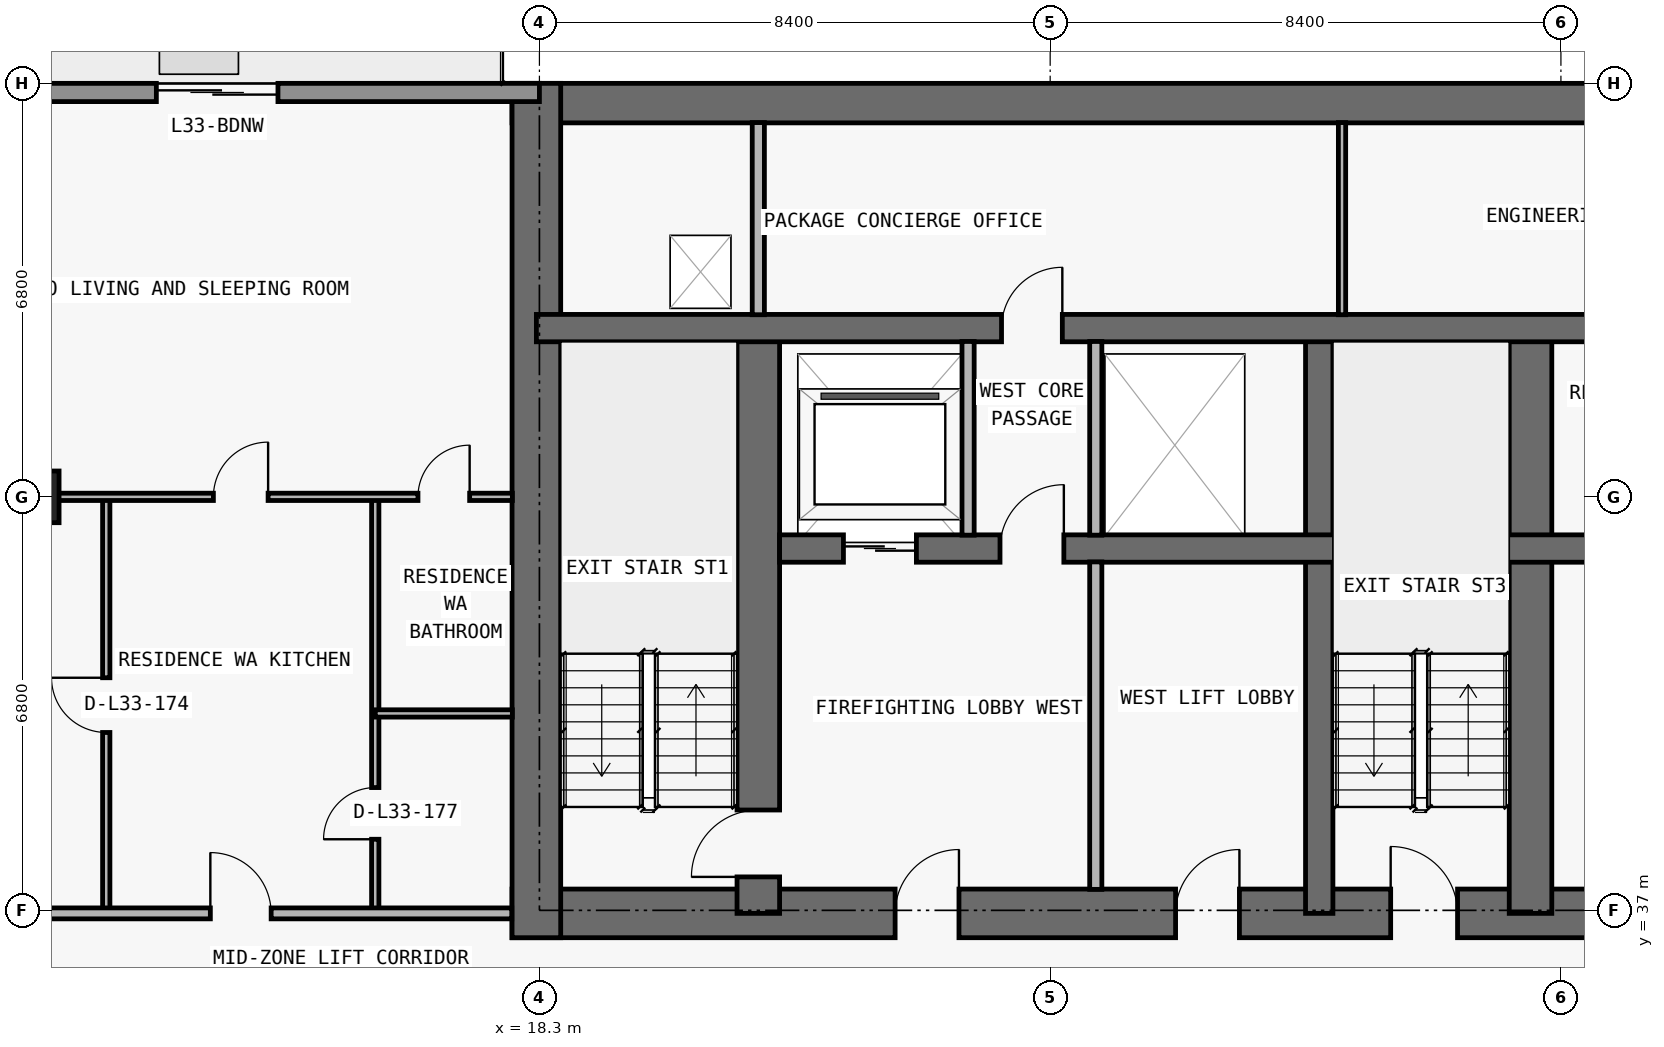
"""IFC4 building model, lengths in metres.
Left out: names, types, materials, properties, quantities, classifications, styles, units other than length and angle.
Written with IfcOpenShell. Run it as: python <this file> out.ifc"""

import sys

from ifc_helpers import new_model, si_unit, direction, frame, frame_2d, origin, origin_2d, place, context, subcontext, project, spatial, rectangle, extrude, element, fill, save


model = new_model("IFC4")
c1 = context("Model", 3, precision=1e-05, world=origin(), true_north=direction((0.0, 1.0)))
c2 = subcontext(c1, "Body", "Model", "MODEL_VIEW")
j1 = project(units=[si_unit("LENGTHUNIT", "METRE"), si_unit("PLANEANGLEUNIT", "RADIAN")], contexts=[c1])
p1 = place(None, origin())
s1 = spatial("IfcSite", under=j1, at=p1, CompositionType="ELEMENT")
p2 = place(p1, origin())
s2 = spatial("IfcBuilding", under=s1, at=p2, CompositionType="ELEMENT")
p3 = place(p2, frame((0.0, 0.0, 122.4)))
s3 = spatial("IfcBuildingStorey", under=s2, at=p3, CompositionType="ELEMENT", Elevation=122.4)
p4 = place(p3, frame((9.9, 43.8, 0.0), z_axis=(0.0, 0.0, 1.0), x_axis=(1.0, 0.0, 0.0)))
e1 = element("IfcColumn", 1, at=p4, inside=s3, PredefinedType="COLUMN", context=c2, shape_type="SweptSolid", body=[
    extrude(rectangle(XDim=1.0, YDim=0.85, at=origin_2d()), origin(), (0.0, 0.0, 1.0), 3.05),
])
p5 = place(p3, frame((17.85, 36.95, 0.0), z_axis=(0.0, 0.0, 1.0), x_axis=(1.0, 0.0, 0.0)))
e2 = element("IfcWall", 2, at=p5, inside=s3, PredefinedType="SHEAR", context=c2, shape_type="SweptSolid", body=[
    extrude(rectangle(XDim=42.1, YDim=0.8, at=frame_2d((21.05, 0.0))), origin(), (0.0, 0.0, 1.0), 3.05),
])
p6 = place(p5, frame((14.45, 0.0, 0.0)))
e3 = element("IfcOpeningElement", 3, at=p6, cuts=e2, PredefinedType="OPENING", context=c2, shape_type="SweptSolid", body=[
    extrude(rectangle(XDim=1.1, YDim=2.15, at=frame_2d((0.55, 1.075))), frame((0.0, 0.41, 0.0), z_axis=(0.0, -1.0, 0.0), x_axis=(1.0, 0.0, 0.0)), (0.0, 0.0, 1.0), 0.82),
])
p7 = place(p5, frame((6.3, 0.0, 0.0)))
e4 = element("IfcOpeningElement", 4, at=p7, cuts=e2, PredefinedType="OPENING", context=c2, shape_type="SweptSolid", body=[
    extrude(rectangle(XDim=1.05, YDim=2.15, at=frame_2d((0.525, 1.075))), frame((0.0, 0.41, 0.0), z_axis=(0.0, -1.0, 0.0), x_axis=(1.0, 0.0, 0.0)), (0.0, 0.0, 1.0), 0.82),
])
p8 = place(p5, frame((34.8, 0.0, 0.0)))
e5 = element("IfcOpeningElement", 5, at=p8, cuts=e2, PredefinedType="OPENING", context=c2, shape_type="SweptSolid", body=[
    extrude(rectangle(XDim=1.05, YDim=2.15, at=frame_2d((0.525, 1.075))), frame((0.0, 0.41, 0.0), z_axis=(0.0, -1.0, 0.0), x_axis=(1.0, 0.0, 0.0)), (0.0, 0.0, 1.0), 0.82),
])
p9 = place(p5, frame((10.913, 0.0, 0.0)))
e6 = element("IfcOpeningElement", 6, at=p9, cuts=e2, PredefinedType="OPENING", context=c2, shape_type="SweptSolid", body=[
    extrude(rectangle(XDim=1.05, YDim=2.15, at=frame_2d((0.525, 1.075))), frame((0.0, 0.41, 0.0), z_axis=(0.0, -1.0, 0.0), x_axis=(1.0, 0.0, 0.0)), (0.0, 0.0, 1.0), 0.82),
])
p10 = place(p5, frame((24.15, 0.0, 0.0)))
e7 = element("IfcOpeningElement", 7, at=p10, cuts=e2, PredefinedType="OPENING", context=c2, shape_type="SweptSolid", body=[
    extrude(rectangle(XDim=1.05, YDim=2.15, at=frame_2d((0.525, 1.075))), frame((0.0, 0.41, 0.0), z_axis=(0.0, -1.0, 0.0), x_axis=(1.0, 0.0, 0.0)), (0.0, 0.0, 1.0), 0.82),
])
p11 = place(p3, frame((17.85, 50.275, 0.0), z_axis=(0.0, 0.0, 1.0), x_axis=(1.0, 0.0, 0.0)))
e8 = element("IfcWall", 8, at=p11, inside=s3, PredefinedType="SHEAR", context=c2, shape_type="SweptSolid", body=[
    extrude(rectangle(XDim=42.1, YDim=0.65, at=frame_2d((21.05, 0.0))), origin(), (0.0, 0.0, 1.0), 3.05),
])
p12 = place(p3, frame((18.25, 36.55, 0.0), z_axis=(0.0, 0.0, 1.0), x_axis=(0.0, 1.0, 0.0)))
e9 = element("IfcWall", 9, at=p12, inside=s3, PredefinedType="SHEAR", context=c2, shape_type="SweptSolid", body=[
    extrude(rectangle(XDim=14.05, YDim=0.8, at=frame_2d((7.025, 0.0))), origin(), (0.0, 0.0, 1.0), 3.05),
])
p13 = place(p3, frame((21.9, 36.95, 0.0), z_axis=(0.0, 0.0, 1.0), x_axis=(0.0, 1.0, 0.0)))
e10 = element("IfcWall", 10, at=p13, inside=s3, PredefinedType="SHEAR", context=c2, shape_type="SweptSolid", body=[
    extrude(rectangle(XDim=9.625, YDim=0.7, at=frame_2d((4.812, 0.0))), origin(), (0.0, 0.0, 1.0), 3.05),
])
p14 = place(p13, frame((0.6, 0.0, 0.0)))
e11 = element("IfcOpeningElement", 11, at=p14, cuts=e10, PredefinedType="OPENING", context=c2, shape_type="SweptSolid", body=[
    extrude(rectangle(XDim=1.1, YDim=2.15, at=frame_2d((0.55, 1.075))), frame((0.0, 0.36, 0.0), z_axis=(0.0, -1.0, 0.0), x_axis=(1.0, 0.0, 0.0)), (0.0, 0.0, 1.0), 0.72),
])
p15 = place(p3, frame((31.125, 36.95, 0.0), z_axis=(0.0, 0.0, 1.0), x_axis=(0.0, 1.0, 0.0)))
e12 = element("IfcWall", 12, at=p15, inside=s3, PredefinedType="SHEAR", context=c2, shape_type="SweptSolid", body=[
    extrude(rectangle(XDim=9.625, YDim=0.45, at=frame_2d((4.812, 0.0))), origin(), (0.0, 0.0, 1.0), 3.05),
])
p16 = place(p3, frame((34.6, 36.95, 0.0), z_axis=(0.0, 0.0, 1.0), x_axis=(0.0, 1.0, 0.0)))
e13 = element("IfcWall", 13, at=p16, inside=s3, PredefinedType="SHEAR", context=c2, shape_type="SweptSolid", body=[
    extrude(rectangle(XDim=9.625, YDim=0.7, at=frame_2d((4.812, 0.0))), origin(), (0.0, 0.0, 1.0), 3.05),
])
p17 = place(p3, frame((22.25, 42.95, 0.0), z_axis=(0.0, 0.0, 1.0), x_axis=(1.0, 0.0, 0.0)))
e14 = element("IfcWall", 14, at=p17, inside=s3, PredefinedType="SHEAR", context=c2, shape_type="SweptSolid", body=[
    extrude(rectangle(XDim=33.3, YDim=0.45, at=frame_2d((16.65, 0.0))), origin(), (0.0, 0.0, 1.0), 3.05),
])
p18 = place(p17, frame((1.05, 0.0, 0.0)))
e15 = element("IfcOpeningElement", 15, at=p18, cuts=e14, PredefinedType="OPENING", context=c2, shape_type="SweptSolid", body=[
    extrude(rectangle(XDim=1.2, YDim=2.2, at=frame_2d((0.6, 1.1))), frame((0.0, 0.235, 0.0), z_axis=(0.0, -1.0, 0.0), x_axis=(1.0, 0.0, 0.0)), (0.0, 0.0, 1.0), 0.47),
])
p19 = place(p17, frame((31.05, 0.0, 0.0)))
e16 = element("IfcOpeningElement", 16, at=p19, cuts=e14, PredefinedType="OPENING", context=c2, shape_type="SweptSolid", body=[
    extrude(rectangle(XDim=1.2, YDim=2.2, at=frame_2d((0.6, 1.1))), frame((0.0, 0.235, 0.0), z_axis=(0.0, -1.0, 0.0), x_axis=(1.0, 0.0, 0.0)), (0.0, 0.0, 1.0), 0.47),
])
p20 = place(p17, frame((21.4, 0.0, 0.0)))
e17 = element("IfcOpeningElement", 17, at=p20, cuts=e14, PredefinedType="OPENING", context=c2, shape_type="SweptSolid", body=[
    extrude(rectangle(XDim=1.1, YDim=2.2, at=frame_2d((0.55, 1.1))), frame((0.0, 0.235, 0.0), z_axis=(0.0, -1.0, 0.0), x_axis=(1.0, 0.0, 0.0)), (0.0, 0.0, 1.0), 0.47),
])
p21 = place(p17, frame((24.0, 0.0, 0.0)))
e18 = element("IfcOpeningElement", 18, at=p21, cuts=e14, PredefinedType="OPENING", context=c2, shape_type="SweptSolid", body=[
    extrude(rectangle(XDim=1.1, YDim=2.2, at=frame_2d((0.55, 1.1))), frame((0.0, 0.235, 0.0), z_axis=(0.0, -1.0, 0.0), x_axis=(1.0, 0.0, 0.0)), (0.0, 0.0, 1.0), 0.47),
])
p22 = place(p17, frame((3.625, 0.0, 0.0)))
e19 = element("IfcOpeningElement", 19, at=p22, cuts=e14, PredefinedType="OPENING", context=c2, shape_type="SweptSolid", body=[
    extrude(rectangle(XDim=1.05, YDim=2.15, at=frame_2d((0.525, 1.075))), frame((0.0, 0.235, 0.0), z_axis=(0.0, -1.0, 0.0), x_axis=(1.0, 0.0, 0.0)), (0.0, 0.0, 1.0), 0.47),
])
p23 = place(p17, frame((28.675, 0.0, 0.0)))
e20 = element("IfcOpeningElement", 20, at=p23, cuts=e14, PredefinedType="OPENING", context=c2, shape_type="SweptSolid", body=[
    extrude(rectangle(XDim=1.05, YDim=2.15, at=frame_2d((0.525, 1.075))), frame((0.0, 0.235, 0.0), z_axis=(0.0, -1.0, 0.0), x_axis=(1.0, 0.0, 0.0)), (0.0, 0.0, 1.0), 0.47),
])
p24 = place(p17, frame((13.925, 0.0, 0.0)))
e21 = element("IfcOpeningElement", 21, at=p24, cuts=e14, PredefinedType="OPENING", context=c2, shape_type="SweptSolid", body=[
    extrude(rectangle(XDim=1.0, YDim=2.2, at=frame_2d((0.5, 1.1))), frame((0.0, 0.235, 0.0), z_axis=(0.0, -1.0, 0.0), x_axis=(1.0, 0.0, 0.0)), (0.0, 0.0, 1.0), 0.47),
])
p25 = place(p17, frame((18.05, 0.0, 0.0)))
e22 = element("IfcOpeningElement", 22, at=p25, cuts=e14, PredefinedType="OPENING", context=c2, shape_type="SweptSolid", body=[
    extrude(rectangle(XDim=1.0, YDim=2.2, at=frame_2d((0.5, 1.1))), frame((0.0, 0.235, 0.0), z_axis=(0.0, -1.0, 0.0), x_axis=(1.0, 0.0, 0.0)), (0.0, 0.0, 1.0), 0.47),
])
p26 = place(p3, frame((18.25, 46.575, 0.0), z_axis=(0.0, 0.0, 1.0), x_axis=(1.0, 0.0, 0.0)))
e23 = element("IfcWall", 23, at=p26, inside=s3, PredefinedType="SHEAR", context=c2, shape_type="SweptSolid", body=[
    extrude(rectangle(XDim=41.3, YDim=0.45, at=frame_2d((20.65, 0.0))), origin(), (0.0, 0.0, 1.0), 3.05),
])
p27 = place(p26, frame((7.65, 0.0, 0.0)))
e24 = element("IfcOpeningElement", 24, at=p27, cuts=e23, PredefinedType="OPENING", context=c2, shape_type="SweptSolid", body=[
    extrude(rectangle(XDim=1.0, YDim=2.2, at=frame_2d((0.5, 1.1))), frame((0.0, 0.235, 0.0), z_axis=(0.0, -1.0, 0.0), x_axis=(1.0, 0.0, 0.0)), (0.0, 0.0, 1.0), 0.47),
])
p28 = place(p26, frame((32.675, 0.0, 0.0)))
e25 = element("IfcOpeningElement", 25, at=p28, cuts=e23, PredefinedType="OPENING", context=c2, shape_type="SweptSolid", body=[
    extrude(rectangle(XDim=1.05, YDim=2.15, at=frame_2d((0.525, 1.075))), frame((0.0, 0.235, 0.0), z_axis=(0.0, -1.0, 0.0), x_axis=(1.0, 0.0, 0.0)), (0.0, 0.0, 1.0), 0.47),
])
p29 = place(p3, frame((7.7, 50.45, 0.0), z_axis=(0.0, 0.0, 1.0), x_axis=(1.0, 0.0, 0.0)))
e26 = element("IfcWall", 26, at=p29, inside=s3, PredefinedType="STANDARD", context=c2, shape_type="SweptSolid", body=[
    extrude(rectangle(XDim=10.6, YDim=0.3, at=frame_2d((5.3, 0.0))), origin(), (0.0, 0.0, 1.0), 3.05),
])
p30 = place(p29, frame((4.3, 0.0, 0.0)))
e27 = element("IfcOpeningElement", 27, at=p30, cuts=e26, PredefinedType="OPENING", context=c2, shape_type="SweptSolid", body=[
    extrude(rectangle(XDim=2.0, YDim=2.3, at=frame_2d((1.0, 1.15))), frame((0.0, 0.16, 0.0), z_axis=(0.0, -1.0, 0.0), x_axis=(1.0, 0.0, 0.0)), (0.0, 0.0, 1.0), 0.32),
])
p31 = place(p3, frame((11.176, 36.95, 0.0), z_axis=(0.0, 0.0, 1.0), x_axis=(0.0, 1.0, 0.0)))
e28 = element("IfcWall", 28, at=p31, inside=s3, PredefinedType="PARTITIONING", context=c2, shape_type="SweptSolid", body=[
    extrude(rectangle(XDim=6.85, YDim=0.12, at=frame_2d((3.425, 0.0))), origin(), (0.0, 0.0, 1.0), 3.05),
])
p32 = place(p31, frame((2.975, 0.0, 0.0)))
e29 = element("IfcOpeningElement", 29, at=p32, cuts=e28, PredefinedType="OPENING", context=c2, shape_type="SweptSolid", body=[
    extrude(rectangle(XDim=0.9, YDim=2.15, at=frame_2d((0.45, 1.075))), frame((0.0, 0.07, 0.0), z_axis=(0.0, -1.0, 0.0), x_axis=(1.0, 0.0, 0.0)), (0.0, 0.0, 1.0), 0.14),
])
p33 = place(p3, frame((15.6, 36.95, 0.0), z_axis=(0.0, 0.0, 1.0), x_axis=(0.0, 1.0, 0.0)))
e30 = element("IfcWall", 30, at=p33, inside=s3, PredefinedType="PARTITIONING", context=c2, shape_type="SweptSolid", body=[
    extrude(rectangle(XDim=6.85, YDim=0.12, at=frame_2d((3.425, 0.0))), origin(), (0.0, 0.0, 1.0), 3.05),
])
p34 = place(p33, frame((1.219, 0.0, 0.0)))
e31 = element("IfcOpeningElement", 31, at=p34, cuts=e30, PredefinedType="OPENING", context=c2, shape_type="SweptSolid", body=[
    extrude(rectangle(XDim=0.85, YDim=2.1, at=frame_2d((0.425, 1.05))), frame((0.0, 0.07, 0.0), z_axis=(0.0, -1.0, 0.0), x_axis=(1.0, 0.0, 0.0)), (0.0, 0.0, 1.0), 0.14),
])
p35 = place(p3, frame((21.9, 46.795, 0.0), z_axis=(0.0, 0.0, 1.0), x_axis=(0.0, 1.0, 0.0)))
e32 = element("IfcWall", 32, at=p35, inside=s3, PredefinedType="PARTITIONING", context=c2, shape_type="SweptSolid", body=[
    extrude(rectangle(XDim=3.16, YDim=0.2, at=frame_2d((1.58, 0.0))), origin(), (0.0, 0.0, 1.0), 3.05),
])
p36 = place(p3, frame((25.35, 43.17, 0.0), z_axis=(0.0, 0.0, 1.0), x_axis=(0.0, 1.0, 0.0)))
e33 = element("IfcWall", 33, at=p36, inside=s3, PredefinedType="PARTITIONING", context=c2, shape_type="SweptSolid", body=[
    extrude(rectangle(XDim=3.185, YDim=0.2, at=frame_2d((1.593, 0.0))), origin(), (0.0, 0.0, 1.0), 3.05),
])
p37 = place(p3, frame((27.45, 37.345, 0.0), z_axis=(0.0, 0.0, 1.0), x_axis=(0.0, 1.0, 0.0)))
e34 = element("IfcWall", 34, at=p37, inside=s3, PredefinedType="PARTITIONING", context=c2, shape_type="SweptSolid", body=[
    extrude(rectangle(XDim=5.385, YDim=0.2, at=frame_2d((2.692, 0.0))), origin(), (0.0, 0.0, 1.0), 3.05),
])
p38 = place(p3, frame((27.45, 43.17, 0.0), z_axis=(0.0, 0.0, 1.0), x_axis=(0.0, 1.0, 0.0)))
e35 = element("IfcWall", 35, at=p38, inside=s3, PredefinedType="PARTITIONING", context=c2, shape_type="SweptSolid", body=[
    extrude(rectangle(XDim=3.185, YDim=0.2, at=frame_2d((1.593, 0.0))), origin(), (0.0, 0.0, 1.0), 3.05),
])
p39 = place(p3, frame((31.5, 46.795, 0.0), z_axis=(0.0, 0.0, 1.0), x_axis=(0.0, 1.0, 0.0)))
e36 = element("IfcWall", 36, at=p39, inside=s3, PredefinedType="PARTITIONING", context=c2, shape_type="SweptSolid", body=[
    extrude(rectangle(XDim=3.16, YDim=0.12, at=frame_2d((1.58, 0.0))), origin(), (0.0, 0.0, 1.0), 3.05),
])
p40 = place(p3, frame((7.7, 36.95, 0.0), z_axis=(0.0, 0.0, 1.0), x_axis=(1.0, 0.0, 0.0)))
e37 = element("IfcWall", 37, at=p40, inside=s3, PredefinedType="PARTITIONING", context=c2, shape_type="SweptSolid", body=[
    extrude(rectangle(XDim=10.145, YDim=0.18, at=frame_2d((5.073, 0.0))), origin(), (0.0, 0.0, 1.0), 3.05),
])
p41 = place(p40, frame((5.188, 0.0, 0.0)))
e38 = element("IfcOpeningElement", 38, at=p41, cuts=e37, PredefinedType="OPENING", context=c2, shape_type="SweptSolid", body=[
    extrude(rectangle(XDim=1.0, YDim=2.2, at=frame_2d((0.5, 1.1))), frame((0.0, 0.1, 0.0), z_axis=(0.0, -1.0, 0.0), x_axis=(1.0, 0.0, 0.0)), (0.0, 0.0, 1.0), 0.2),
])
p42 = place(p3, frame((15.6, 40.238, 0.0), z_axis=(0.0, 0.0, 1.0), x_axis=(1.0, 0.0, 0.0)))
e39 = element("IfcWall", 39, at=p42, inside=s3, PredefinedType="PARTITIONING", context=c2, shape_type="SweptSolid", body=[
    extrude(rectangle(XDim=2.255, YDim=0.12, at=frame_2d((1.127, 0.0))), origin(), (0.0, 0.0, 1.0), 3.05),
])
p43 = place(p3, frame((4.195, 43.8, 0.0), z_axis=(0.0, 0.0, 1.0), x_axis=(1.0, 0.0, 0.0)))
e40 = element("IfcWall", 40, at=p43, inside=s3, PredefinedType="PARTITIONING", context=c2, shape_type="SweptSolid", body=[
    extrude(rectangle(XDim=13.66, YDim=0.12, at=frame_2d((6.83, 0.0))), origin(), (0.0, 0.0, 1.0), 2.339),
])
p44 = place(p43, frame((8.743, 0.0, 0.0)))
e41 = element("IfcOpeningElement", 41, at=p44, cuts=e40, PredefinedType="OPENING", context=c2, shape_type="SweptSolid", body=[
    extrude(rectangle(XDim=0.9, YDim=2.15, at=frame_2d((0.45, 1.075))), frame((0.0, 0.07, 0.0), z_axis=(0.0, -1.0, 0.0), x_axis=(1.0, 0.0, 0.0)), (0.0, 0.0, 1.0), 0.14),
])
p45 = place(p43, frame((12.107, 0.0, 0.0)))
e42 = element("IfcOpeningElement", 42, at=p45, cuts=e40, PredefinedType="OPENING", context=c2, shape_type="SweptSolid", body=[
    extrude(rectangle(XDim=0.85, YDim=2.1, at=frame_2d((0.425, 1.05))), frame((0.0, 0.07, 0.0), z_axis=(0.0, -1.0, 0.0), x_axis=(1.0, 0.0, 0.0)), (0.0, 0.0, 1.0), 0.14),
])
p46 = place(p30, origin())
e43 = element("IfcDoor", 43, at=p46, inside=s3, OperationType="DOUBLE_DOOR_SLIDING", PredefinedType="DOOR", context=c2, shape_type="SweptSolid", body=[
    extrude(rectangle(XDim=2.0, YDim=2.3, at=frame_2d((1.0, 1.15))), frame((0.0, 0.025, 0.0), z_axis=(0.0, -1.0, 0.0), x_axis=(1.0, 0.0, 0.0)), (0.0, 0.0, 1.0), 0.05),
])
fill(e27, e43)
p47 = place(p18, origin())
e44 = element("IfcDoor", 44, at=p47, inside=s3, OperationType="DOUBLE_DOOR_SLIDING", PredefinedType="DOOR", context=c2, shape_type="SweptSolid", body=[
    extrude(rectangle(XDim=1.2, YDim=2.2, at=frame_2d((0.6, 1.1))), frame((0.0, 0.025, 0.0), z_axis=(0.0, -1.0, 0.0), x_axis=(1.0, 0.0, 0.0)), (0.0, 0.0, 1.0), 0.05),
])
fill(e15, e44)
p48 = place(p6, origin())
e45 = element("IfcDoor", 45, at=p48, inside=s3, OperationType="SINGLE_SWING_LEFT", PredefinedType="DOOR", context=c2, shape_type="SweptSolid", body=[
    extrude(rectangle(XDim=1.1, YDim=2.15, at=frame_2d((0.55, 1.075))), frame((0.0, 0.025, 0.0), z_axis=(0.0, -1.0, 0.0), x_axis=(1.0, 0.0, 0.0)), (0.0, 0.0, 1.0), 0.05),
])
fill(e3, e45)
p49 = place(p7, origin())
e46 = element("IfcDoor", 46, at=p49, inside=s3, OperationType="SINGLE_SWING_RIGHT", PredefinedType="DOOR", context=c2, shape_type="SweptSolid", body=[
    extrude(rectangle(XDim=1.05, YDim=2.15, at=frame_2d((0.525, 1.075))), frame((0.0, 0.025, 0.0), z_axis=(0.0, -1.0, 0.0), x_axis=(1.0, 0.0, 0.0)), (0.0, 0.0, 1.0), 0.05),
])
fill(e4, e46)
p50 = place(p14, origin())
e47 = element("IfcDoor", 47, at=p50, inside=s3, OperationType="SINGLE_SWING_LEFT", PredefinedType="DOOR", context=c2, shape_type="SweptSolid", body=[
    extrude(rectangle(XDim=1.1, YDim=2.15, at=frame_2d((0.55, 1.075))), frame((0.0, 0.025, 0.0), z_axis=(0.0, -1.0, 0.0), x_axis=(1.0, 0.0, 0.0)), (0.0, 0.0, 1.0), 0.05),
])
fill(e11, e47)
p51 = place(p22, origin())
e48 = element("IfcDoor", 48, at=p51, inside=s3, OperationType="SINGLE_SWING_RIGHT", PredefinedType="DOOR", context=c2, shape_type="SweptSolid", body=[
    extrude(rectangle(XDim=1.05, YDim=2.15, at=frame_2d((0.525, 1.075))), frame((0.0, 0.025, 0.0), z_axis=(0.0, -1.0, 0.0), x_axis=(1.0, 0.0, 0.0)), (0.0, 0.0, 1.0), 0.05),
])
fill(e19, e48)
p52 = place(p9, origin())
e49 = element("IfcDoor", 49, at=p52, inside=s3, OperationType="SINGLE_SWING_RIGHT", PredefinedType="DOOR", context=c2, shape_type="SweptSolid", body=[
    extrude(rectangle(XDim=1.05, YDim=2.15, at=frame_2d((0.525, 1.075))), frame((0.0, 0.025, 0.0), z_axis=(0.0, -1.0, 0.0), x_axis=(1.0, 0.0, 0.0)), (0.0, 0.0, 1.0), 0.05),
])
fill(e6, e49)
p53 = place(p27, origin())
e50 = element("IfcDoor", 50, at=p53, inside=s3, OperationType="SINGLE_SWING_RIGHT", PredefinedType="DOOR", context=c2, shape_type="SweptSolid", body=[
    extrude(rectangle(XDim=1.0, YDim=2.2, at=frame_2d((0.5, 1.1))), frame((0.0, 0.025, 0.0), z_axis=(0.0, -1.0, 0.0), x_axis=(1.0, 0.0, 0.0)), (0.0, 0.0, 1.0), 0.05),
])
fill(e24, e50)
p54 = place(p32, origin())
e51 = element("IfcDoor", 51, at=p54, inside=s3, OperationType="SINGLE_SWING_RIGHT", PredefinedType="DOOR", context=c2, shape_type="SweptSolid", body=[
    extrude(rectangle(XDim=0.9, YDim=2.15, at=frame_2d((0.45, 1.075))), frame((0.0, 0.025, 0.0), z_axis=(0.0, -1.0, 0.0), x_axis=(1.0, 0.0, 0.0)), (0.0, 0.0, 1.0), 0.05),
])
fill(e29, e51)
p55 = place(p41, origin())
e52 = element("IfcDoor", 52, at=p55, inside=s3, OperationType="SINGLE_SWING_LEFT", PredefinedType="DOOR", context=c2, shape_type="SweptSolid", body=[
    extrude(rectangle(XDim=1.0, YDim=2.2, at=frame_2d((0.5, 1.1))), frame((0.0, 0.025, 0.0), z_axis=(0.0, -1.0, 0.0), x_axis=(1.0, 0.0, 0.0)), (0.0, 0.0, 1.0), 0.05),
])
fill(e38, e52)
p56 = place(p44, origin())
e53 = element("IfcDoor", 53, at=p56, inside=s3, OperationType="SINGLE_SWING_RIGHT", PredefinedType="DOOR", context=c2, shape_type="SweptSolid", body=[
    extrude(rectangle(XDim=0.9, YDim=2.15, at=frame_2d((0.45, 1.075))), frame((0.0, 0.025, 0.0), z_axis=(0.0, -1.0, 0.0), x_axis=(1.0, 0.0, 0.0)), (0.0, 0.0, 1.0), 0.05),
])
fill(e41, e53)
p57 = place(p34, origin())
e54 = element("IfcDoor", 54, at=p57, inside=s3, OperationType="SINGLE_SWING_LEFT", PredefinedType="DOOR", context=c2, shape_type="SweptSolid", body=[
    extrude(rectangle(XDim=0.85, YDim=2.1, at=frame_2d((0.425, 1.05))), frame((0.0, 0.025, 0.0), z_axis=(0.0, -1.0, 0.0), x_axis=(1.0, 0.0, 0.0)), (0.0, 0.0, 1.0), 0.05),
])
fill(e31, e54)
p58 = place(p45, origin())
e55 = element("IfcDoor", 55, at=p58, inside=s3, OperationType="SINGLE_SWING_RIGHT", PredefinedType="DOOR", context=c2, shape_type="SweptSolid", body=[
    extrude(rectangle(XDim=0.85, YDim=2.1, at=frame_2d((0.425, 1.05))), frame((0.0, 0.025, 0.0), z_axis=(0.0, -1.0, 0.0), x_axis=(1.0, 0.0, 0.0)), (0.0, 0.0, 1.0), 0.05),
])
fill(e42, e55)
save(model, sys.argv[1])
